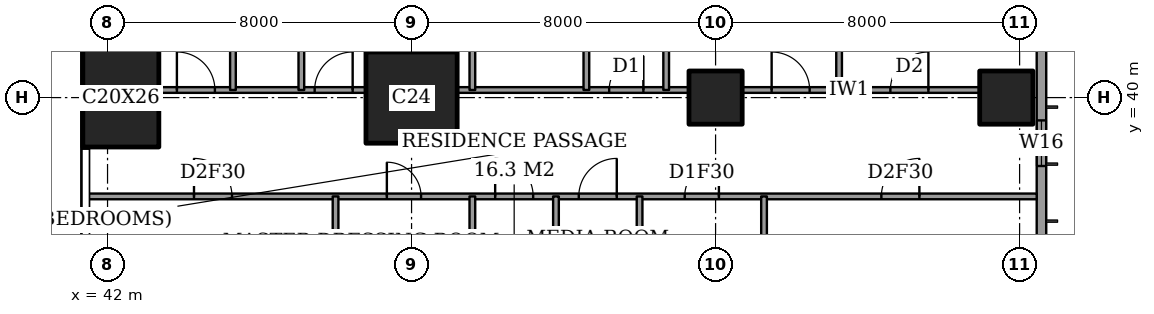
"""IFC4 building model, lengths in metres.
Left out: names, types, materials, properties, quantities, classifications, styles, units other than length and angle.
Written with IfcOpenShell. Run it as: python <this file> out.ifc"""

import sys

from ifc_helpers import new_model, si_unit, direction, frame, frame_2d, origin, origin_2d, place, context, subcontext, project, spatial, rectangle, extrude, element, fill, save


model = new_model("IFC4")
c1 = context("Model", 3, precision=1e-05, world=origin(), true_north=direction((0.0, 1.0)))
c2 = subcontext(c1, "Body", "Model", "MODEL_VIEW")
j1 = project(units=[si_unit("LENGTHUNIT", "METRE"), si_unit("PLANEANGLEUNIT", "RADIAN")], contexts=[c1])
p1 = place(None, origin())
s1 = spatial("IfcSite", under=j1, at=p1, CompositionType="ELEMENT")
p2 = place(p1, origin())
s2 = spatial("IfcBuilding", under=s1, at=p2, CompositionType="ELEMENT")
p3 = place(p2, frame((0.0, 0.0, 287.1)))
s3 = spatial("IfcBuildingStorey", under=s2, at=p3, CompositionType="ELEMENT", Elevation=287.1)
p4 = place(p3, frame((42.35, 40.0, 0.0), z_axis=(0.0, 0.0, 1.0), x_axis=(1.0, 0.0, 0.0)))
e1 = element("IfcColumn", 1, at=p4, inside=s3, PredefinedType="COLUMN", context=c2, shape_type="SweptSolid", body=[
    extrude(rectangle(XDim=2.0, YDim=2.6, at=origin_2d()), origin(), (0.0, 0.0, 1.0), 4.5),
])
p5 = place(p3, frame((50.0, 40.0, 0.0), z_axis=(0.0, 0.0, 1.0), x_axis=(1.0, 0.0, 0.0)))
e2 = element("IfcColumn", 2, at=p5, inside=s3, PredefinedType="COLUMN", context=c2, shape_type="SweptSolid", body=[
    extrude(rectangle(XDim=2.4, YDim=2.4, at=origin_2d()), origin(), (0.0, 0.0, 1.0), 4.5),
])
for number, where, z_axis, x_axis in (
    (3, (58.0, 40.0, 0.0), (0.0, 0.0, 1.0), (1.0, 0.0, 0.0)),
    (4, (65.65, 40.0, 0.0), (0.0, 0.0, 1.0), (1.0, 0.0, 0.0)),
):
    element("IfcColumn", number, at=place(p3, frame(where, z_axis=z_axis, x_axis=x_axis)), inside=s3, PredefinedType="COLUMN", context=c2, shape_type="SweptSolid", body=[
        extrude(rectangle(XDim=1.4, YDim=1.4, at=origin_2d()), origin(), (0.0, 0.0, 1.0), 4.5),
    ])
p6 = place(p3, frame((66.575, 3.175, 0.0), z_axis=(0.0, 0.0, 1.0), x_axis=(0.0, 1.0, 0.0)))
e5 = element("IfcWall", 5, at=p6, inside=s3, PredefinedType="SOLIDWALL", context=c2, shape_type="SweptSolid", body=[
    extrude(rectangle(XDim=41.65, YDim=0.25, at=frame_2d((20.825, 0.0))), origin(), (0.0, 0.0, 1.0), 4.5),
])
p7 = place(p6, frame((1.275, 0.0, 0.6)))
e6 = element("IfcOpeningElement", 6, at=p7, cuts=e5, PredefinedType="OPENING", context=c2, shape_type="SweptSolid", body=[
    extrude(rectangle(XDim=2.4, YDim=2.8, at=frame_2d((1.2, 1.4))), frame((0.0, 0.135, 0.0), z_axis=(0.0, -1.0, 0.0), x_axis=(1.0, 0.0, 0.0)), (0.0, 0.0, 1.0), 0.27),
])
p8 = place(p6, frame((5.525, 0.0, 0.6)))
e7 = element("IfcOpeningElement", 7, at=p8, cuts=e5, PredefinedType="OPENING", context=c2, shape_type="SweptSolid", body=[
    extrude(rectangle(XDim=1.2, YDim=2.8, at=frame_2d((0.6, 1.4))), frame((0.0, 0.135, 0.0), z_axis=(0.0, -1.0, 0.0), x_axis=(1.0, 0.0, 0.0)), (0.0, 0.0, 1.0), 0.27),
])
p9 = place(p6, frame((9.425, 0.0, 0.6)))
e8 = element("IfcOpeningElement", 8, at=p9, cuts=e5, PredefinedType="OPENING", context=c2, shape_type="SweptSolid", body=[
    extrude(rectangle(XDim=2.4, YDim=2.8, at=frame_2d((1.2, 1.4))), frame((0.0, 0.135, 0.0), z_axis=(0.0, -1.0, 0.0), x_axis=(1.0, 0.0, 0.0)), (0.0, 0.0, 1.0), 0.27),
])
p10 = place(p6, frame((14.525, 0.0, 0.6)))
e9 = element("IfcOpeningElement", 9, at=p10, cuts=e5, PredefinedType="OPENING", context=c2, shape_type="SweptSolid", body=[
    extrude(rectangle(XDim=2.4, YDim=2.8, at=frame_2d((1.2, 1.4))), frame((0.0, 0.135, 0.0), z_axis=(0.0, -1.0, 0.0), x_axis=(1.0, 0.0, 0.0)), (0.0, 0.0, 1.0), 0.27),
])
p11 = place(p6, frame((17.725, 0.0, 0.6)))
e10 = element("IfcOpeningElement", 10, at=p11, cuts=e5, PredefinedType="OPENING", context=c2, shape_type="SweptSolid", body=[
    extrude(rectangle(XDim=2.4, YDim=2.8, at=frame_2d((1.2, 1.4))), frame((0.0, 0.135, 0.0), z_axis=(0.0, -1.0, 0.0), x_axis=(1.0, 0.0, 0.0)), (0.0, 0.0, 1.0), 0.27),
])
p12 = place(p6, frame((21.525, 0.0, 0.6)))
e11 = element("IfcOpeningElement", 11, at=p12, cuts=e5, PredefinedType="OPENING", context=c2, shape_type="SweptSolid", body=[
    extrude(rectangle(XDim=2.4, YDim=2.8, at=frame_2d((1.2, 1.4))), frame((0.0, 0.135, 0.0), z_axis=(0.0, -1.0, 0.0), x_axis=(1.0, 0.0, 0.0)), (0.0, 0.0, 1.0), 0.27),
])
p13 = place(p6, frame((24.725, 0.0, 0.6)))
e12 = element("IfcOpeningElement", 12, at=p13, cuts=e5, PredefinedType="OPENING", context=c2, shape_type="SweptSolid", body=[
    extrude(rectangle(XDim=2.4, YDim=2.8, at=frame_2d((1.2, 1.4))), frame((0.0, 0.135, 0.0), z_axis=(0.0, -1.0, 0.0), x_axis=(1.0, 0.0, 0.0)), (0.0, 0.0, 1.0), 0.27),
])
p14 = place(p6, frame((29.825, 0.0, 0.6)))
e13 = element("IfcOpeningElement", 13, at=p14, cuts=e5, PredefinedType="OPENING", context=c2, shape_type="SweptSolid", body=[
    extrude(rectangle(XDim=2.4, YDim=2.8, at=frame_2d((1.2, 1.4))), frame((0.0, 0.135, 0.0), z_axis=(0.0, -1.0, 0.0), x_axis=(1.0, 0.0, 0.0)), (0.0, 0.0, 1.0), 0.27),
])
p15 = place(p6, frame((35.025, 0.0, 0.6)))
e14 = element("IfcOpeningElement", 14, at=p15, cuts=e5, PredefinedType="OPENING", context=c2, shape_type="SweptSolid", body=[
    extrude(rectangle(XDim=1.2, YDim=2.8, at=frame_2d((0.6, 1.4))), frame((0.0, 0.135, 0.0), z_axis=(0.0, -1.0, 0.0), x_axis=(1.0, 0.0, 0.0)), (0.0, 0.0, 1.0), 0.27),
])
p16 = place(p6, frame((38.075, 0.0, 0.6)))
e15 = element("IfcOpeningElement", 15, at=p16, cuts=e5, PredefinedType="OPENING", context=c2, shape_type="SweptSolid", body=[
    extrude(rectangle(XDim=2.4, YDim=2.8, at=frame_2d((1.2, 1.4))), frame((0.0, 0.135, 0.0), z_axis=(0.0, -1.0, 0.0), x_axis=(1.0, 0.0, 0.0)), (0.0, 0.0, 1.0), 0.27),
])
p17 = place(p3, frame((41.439, 37.4, 0.0), z_axis=(0.0, 0.0, 1.0), x_axis=(1.0, 0.0, 0.0)))
e16 = element("IfcWall", 16, at=p17, inside=s3, PredefinedType="PARTITIONING", context=c2, shape_type="SweptSolid", body=[
    extrude(rectangle(XDim=25.011, YDim=0.15, at=frame_2d((12.505, 0.0))), origin(), (0.0, 0.0, 1.0), 4.2),
])
p18 = place(p17, frame((10.761, 0.0, 0.0)))
e17 = element("IfcOpeningElement", 17, at=p18, cuts=e16, PredefinedType="OPENING", context=c2, shape_type="SweptSolid", body=[
    extrude(rectangle(XDim=1.0, YDim=2.1, at=frame_2d((0.5, 1.05))), frame((0.0, 0.085, 0.0), z_axis=(0.0, -1.0, 0.0), x_axis=(1.0, 0.0, 0.0)), (0.0, 0.0, 1.0), 0.17),
])
p19 = place(p17, frame((20.924, 0.0, 0.0)))
e18 = element("IfcOpeningElement", 18, at=p19, cuts=e16, PredefinedType="OPENING", context=c2, shape_type="SweptSolid", body=[
    extrude(rectangle(XDim=1.0, YDim=2.1, at=frame_2d((0.5, 1.05))), frame((0.0, 0.085, 0.0), z_axis=(0.0, -1.0, 0.0), x_axis=(1.0, 0.0, 0.0)), (0.0, 0.0, 1.0), 0.17),
])
p20 = place(p17, frame((15.749, 0.0, 0.0)))
e19 = element("IfcOpeningElement", 19, at=p20, cuts=e16, PredefinedType="OPENING", context=c2, shape_type="SweptSolid", body=[
    extrude(rectangle(XDim=0.9, YDim=2.1, at=frame_2d((0.45, 1.05))), frame((0.0, 0.085, 0.0), z_axis=(0.0, -1.0, 0.0), x_axis=(1.0, 0.0, 0.0)), (0.0, 0.0, 1.0), 0.17),
])
p21 = place(p17, frame((12.961, 0.0, 0.0)))
e20 = element("IfcOpeningElement", 20, at=p21, cuts=e16, PredefinedType="OPENING", context=c2, shape_type="SweptSolid", body=[
    extrude(rectangle(XDim=1.0, YDim=2.1, at=frame_2d((0.5, 1.05))), frame((0.0, 0.085, 0.0), z_axis=(0.0, -1.0, 0.0), x_axis=(1.0, 0.0, 0.0)), (0.0, 0.0, 1.0), 0.17),
])
p22 = place(p17, frame((7.911, 0.0, 0.0)))
e21 = element("IfcOpeningElement", 21, at=p22, cuts=e16, PredefinedType="OPENING", context=c2, shape_type="SweptSolid", body=[
    extrude(rectangle(XDim=0.9, YDim=2.1, at=frame_2d((0.45, 1.05))), frame((0.0, 0.085, 0.0), z_axis=(0.0, -1.0, 0.0), x_axis=(1.0, 0.0, 0.0)), (0.0, 0.0, 1.0), 0.17),
])
p23 = place(p17, frame((2.836, 0.0, 0.0)))
e22 = element("IfcOpeningElement", 22, at=p23, cuts=e16, PredefinedType="OPENING", context=c2, shape_type="SweptSolid", body=[
    extrude(rectangle(XDim=1.0, YDim=2.1, at=frame_2d((0.5, 1.05))), frame((0.0, 0.085, 0.0), z_axis=(0.0, -1.0, 0.0), x_axis=(1.0, 0.0, 0.0)), (0.0, 0.0, 1.0), 0.17),
])
p24 = place(p3, frame((43.35, 40.2, 0.0), z_axis=(0.0, 0.0, 1.0), x_axis=(1.0, 0.0, 0.0)))
e23 = element("IfcWall", 23, at=p24, inside=s3, PredefinedType="PARTITIONING", context=c2, shape_type="SweptSolid", body=[
    extrude(rectangle(XDim=5.45, YDim=0.15, at=frame_2d((2.725, 0.0))), origin(), (0.0, 0.0, 1.0), 4.2),
])
p25 = place(p24, frame((4.1, 0.0, 0.0)))
e24 = element("IfcOpeningElement", 24, at=p25, cuts=e23, PredefinedType="OPENING", context=c2, shape_type="SweptSolid", body=[
    extrude(rectangle(XDim=1.0, YDim=2.1, at=frame_2d((0.5, 1.05))), frame((0.0, 0.085, 0.0), z_axis=(0.0, -1.0, 0.0), x_axis=(1.0, 0.0, 0.0)), (0.0, 0.0, 1.0), 0.17),
])
p26 = place(p24, frame((0.475, 0.0, 0.0)))
e25 = element("IfcOpeningElement", 25, at=p26, cuts=e23, PredefinedType="OPENING", context=c2, shape_type="SweptSolid", body=[
    extrude(rectangle(XDim=1.0, YDim=2.1, at=frame_2d((0.5, 1.05))), frame((0.0, 0.085, 0.0), z_axis=(0.0, -1.0, 0.0), x_axis=(1.0, 0.0, 0.0)), (0.0, 0.0, 1.0), 0.17),
])
p27 = place(p3, frame((51.2, 40.2, 0.0), z_axis=(0.0, 0.0, 1.0), x_axis=(1.0, 0.0, 0.0)))
e26 = element("IfcWall", 26, at=p27, inside=s3, PredefinedType="PARTITIONING", context=c2, shape_type="SweptSolid", body=[
    extrude(rectangle(XDim=6.1, YDim=0.15, at=frame_2d((3.05, 0.0))), origin(), (0.0, 0.0, 1.0), 4.2),
])
p28 = place(p27, frame((4.0, 0.0, 0.0)))
e27 = element("IfcOpeningElement", 27, at=p28, cuts=e26, PredefinedType="OPENING", context=c2, shape_type="SweptSolid", body=[
    extrude(rectangle(XDim=0.9, YDim=2.1, at=frame_2d((0.45, 1.05))), frame((0.0, 0.085, 0.0), z_axis=(0.0, -1.0, 0.0), x_axis=(1.0, 0.0, 0.0)), (0.0, 0.0, 1.0), 0.17),
])
p29 = place(p3, frame((58.7, 40.2, 0.0), z_axis=(0.0, 0.0, 1.0), x_axis=(1.0, 0.0, 0.0)))
e28 = element("IfcWall", 28, at=p29, inside=s3, PredefinedType="PARTITIONING", context=c2, shape_type="SweptSolid", body=[
    extrude(rectangle(XDim=6.25, YDim=0.15, at=frame_2d((3.125, 0.0))), origin(), (0.0, 0.0, 1.0), 4.2),
])
p30 = place(p29, frame((3.9, 0.0, 0.0)))
e29 = element("IfcOpeningElement", 29, at=p30, cuts=e28, PredefinedType="OPENING", context=c2, shape_type="SweptSolid", body=[
    extrude(rectangle(XDim=1.0, YDim=2.1, at=frame_2d((0.5, 1.05))), frame((0.0, 0.085, 0.0), z_axis=(0.0, -1.0, 0.0), x_axis=(1.0, 0.0, 0.0)), (0.0, 0.0, 1.0), 0.17),
])
p31 = place(p29, frame((0.775, 0.0, 0.0)))
e30 = element("IfcOpeningElement", 30, at=p31, cuts=e28, PredefinedType="OPENING", context=c2, shape_type="SweptSolid", body=[
    extrude(rectangle(XDim=1.0, YDim=2.1, at=frame_2d((0.5, 1.05))), frame((0.0, 0.085, 0.0), z_axis=(0.0, -1.0, 0.0), x_axis=(1.0, 0.0, 0.0)), (0.0, 0.0, 1.0), 0.17),
])
p32 = place(p3, frame((45.3, 40.2, 0.0), z_axis=(0.0, 0.0, 1.0), x_axis=(0.0, 1.0, 0.0)))
e31 = element("IfcWall", 31, at=p32, inside=s3, PredefinedType="PARTITIONING", context=c2, shape_type="SweptSolid", body=[
    extrude(rectangle(XDim=8.361, YDim=0.15, at=frame_2d((4.181, 0.0))), origin(), (0.0, 0.0, 1.0), 4.2),
])
p33 = place(p32, frame((3.675, 0.0, 0.0)))
e32 = element("IfcOpeningElement", 32, at=p33, cuts=e31, PredefinedType="OPENING", context=c2, shape_type="SweptSolid", body=[
    extrude(rectangle(XDim=0.9, YDim=2.1, at=frame_2d((0.45, 1.05))), frame((0.0, 0.085, 0.0), z_axis=(0.0, -1.0, 0.0), x_axis=(1.0, 0.0, 0.0)), (0.0, 0.0, 1.0), 0.17),
])
p34 = place(p3, frame((47.1, 40.2, 0.0), z_axis=(0.0, 0.0, 1.0), x_axis=(0.0, 1.0, 0.0)))
e33 = element("IfcWall", 33, at=p34, inside=s3, PredefinedType="PARTITIONING", context=c2, shape_type="SweptSolid", body=[
    extrude(rectangle(XDim=8.361, YDim=0.15, at=frame_2d((4.181, 0.0))), origin(), (0.0, 0.0, 1.0), 4.2),
])
p35 = place(p3, frame((48.0, 28.0, 0.0), z_axis=(0.0, 0.0, 1.0), x_axis=(0.0, 1.0, 0.0)))
e34 = element("IfcWall", 34, at=p35, inside=s3, PredefinedType="PARTITIONING", context=c2, shape_type="SweptSolid", body=[
    extrude(rectangle(XDim=9.4, YDim=0.15, at=frame_2d((4.7, 0.0))), origin(), (0.0, 0.0, 1.0), 4.2),
])
p36 = place(p35, frame((0.5, 0.0, 0.0)))
e35 = element("IfcOpeningElement", 35, at=p36, cuts=e34, PredefinedType="OPENING", context=c2, shape_type="SweptSolid", body=[
    extrude(rectangle(XDim=1.0, YDim=2.1, at=frame_2d((0.5, 1.05))), frame((0.0, 0.085, 0.0), z_axis=(0.0, -1.0, 0.0), x_axis=(1.0, 0.0, 0.0)), (0.0, 0.0, 1.0), 0.17),
])
p37 = place(p3, frame((51.6, 30.0, 0.0), z_axis=(0.0, 0.0, 1.0), x_axis=(0.0, 1.0, 0.0)))
e36 = element("IfcWall", 36, at=p37, inside=s3, PredefinedType="PARTITIONING", context=c2, shape_type="SweptSolid", body=[
    extrude(rectangle(XDim=7.4, YDim=0.15, at=frame_2d((3.7, 0.0))), origin(), (0.0, 0.0, 1.0), 4.2),
])
p38 = place(p3, frame((51.6, 40.2, 0.0), z_axis=(0.0, 0.0, 1.0), x_axis=(0.0, 1.0, 0.0)))
e37 = element("IfcWall", 37, at=p38, inside=s3, PredefinedType="PARTITIONING", context=c2, shape_type="SweptSolid", body=[
    extrude(rectangle(XDim=8.361, YDim=0.15, at=frame_2d((4.181, 0.0))), origin(), (0.0, 0.0, 1.0), 4.2),
])
p39 = place(p38, frame((3.675, 0.0, 0.0)))
e38 = element("IfcOpeningElement", 38, at=p39, cuts=e37, PredefinedType="OPENING", context=c2, shape_type="SweptSolid", body=[
    extrude(rectangle(XDim=0.9, YDim=2.1, at=frame_2d((0.45, 1.05))), frame((0.0, 0.085, 0.0), z_axis=(0.0, -1.0, 0.0), x_axis=(1.0, 0.0, 0.0)), (0.0, 0.0, 1.0), 0.17),
])
p40 = place(p3, frame((53.8, 30.0, 0.0), z_axis=(0.0, 0.0, 1.0), x_axis=(0.0, 1.0, 0.0)))
e39 = element("IfcWall", 39, at=p40, inside=s3, PredefinedType="PARTITIONING", context=c2, shape_type="SweptSolid", body=[
    extrude(rectangle(XDim=7.4, YDim=0.15, at=frame_2d((3.7, 0.0))), origin(), (0.0, 0.0, 1.0), 4.2),
])
p41 = place(p3, frame((54.6, 40.2, 0.0), z_axis=(0.0, 0.0, 1.0), x_axis=(0.0, 1.0, 0.0)))
e40 = element("IfcWall", 40, at=p41, inside=s3, PredefinedType="PARTITIONING", context=c2, shape_type="SweptSolid", body=[
    extrude(rectangle(XDim=8.361, YDim=0.15, at=frame_2d((4.181, 0.0))), origin(), (0.0, 0.0, 1.0), 4.2),
])
p42 = place(p3, frame((56.0, 28.0, 0.0), z_axis=(0.0, 0.0, 1.0), x_axis=(0.0, 1.0, 0.0)))
e41 = element("IfcWall", 41, at=p42, inside=s3, PredefinedType="PARTITIONING", context=c2, shape_type="SweptSolid", body=[
    extrude(rectangle(XDim=9.4, YDim=0.15, at=frame_2d((4.7, 0.0))), origin(), (0.0, 0.0, 1.0), 4.2),
])
p43 = place(p42, frame((0.5, 0.0, 0.0)))
e42 = element("IfcOpeningElement", 42, at=p43, cuts=e41, PredefinedType="OPENING", context=c2, shape_type="SweptSolid", body=[
    extrude(rectangle(XDim=1.0, YDim=2.1, at=frame_2d((0.5, 1.05))), frame((0.0, 0.085, 0.0), z_axis=(0.0, -1.0, 0.0), x_axis=(1.0, 0.0, 0.0)), (0.0, 0.0, 1.0), 0.17),
])
p44 = place(p3, frame((56.7, 40.2, 0.0), z_axis=(0.0, 0.0, 1.0), x_axis=(0.0, 1.0, 0.0)))
e43 = element("IfcWall", 43, at=p44, inside=s3, PredefinedType="PARTITIONING", context=c2, shape_type="SweptSolid", body=[
    extrude(rectangle(XDim=8.361, YDim=0.15, at=frame_2d((4.181, 0.0))), origin(), (0.0, 0.0, 1.0), 4.2),
])
p45 = place(p3, frame((59.275, 33.2, 0.0), z_axis=(0.0, 0.0, 1.0), x_axis=(0.0, 1.0, 0.0)))
e44 = element("IfcWall", 44, at=p45, inside=s3, PredefinedType="PARTITIONING", context=c2, shape_type="SweptSolid", body=[
    extrude(rectangle(XDim=4.2, YDim=0.15, at=frame_2d((2.1, 0.0))), origin(), (0.0, 0.0, 1.0), 4.2),
])
p46 = place(p3, frame((61.25, 40.2, 0.0), z_axis=(0.0, 0.0, 1.0), x_axis=(0.0, 1.0, 0.0)))
e45 = element("IfcWall", 45, at=p46, inside=s3, PredefinedType="PARTITIONING", context=c2, shape_type="SweptSolid", body=[
    extrude(rectangle(XDim=8.361, YDim=0.15, at=frame_2d((4.181, 0.0))), origin(), (0.0, 0.0, 1.0), 4.2),
])
p47 = place(p15, origin())
e46 = element("IfcWindow", 46, at=p47, inside=s3, PartitioningType="SINGLE_PANEL", PredefinedType="WINDOW", context=c2, shape_type="SweptSolid", body=[
    extrude(rectangle(XDim=1.2, YDim=2.8, at=frame_2d((0.6, 1.4))), frame((0.0, 0.03, 0.0), z_axis=(0.0, -1.0, 0.0), x_axis=(1.0, 0.0, 0.0)), (0.0, 0.0, 1.0), 0.06),
])
fill(e14, e46)
p48 = place(p30, origin())
e47 = element("IfcDoor", 47, at=p48, inside=s3, OperationType="SINGLE_SWING_LEFT", PredefinedType="DOOR", context=c2, shape_type="SweptSolid", body=[
    extrude(rectangle(XDim=1.0, YDim=2.1, at=frame_2d((0.5, 1.05))), frame((0.0, 0.025, 0.0), z_axis=(0.0, -1.0, 0.0), x_axis=(1.0, 0.0, 0.0)), (0.0, 0.0, 1.0), 0.05),
])
fill(e29, e47)
p49 = place(p31, origin())
e48 = element("IfcDoor", 48, at=p49, inside=s3, OperationType="SINGLE_SWING_RIGHT", PredefinedType="DOOR", context=c2, shape_type="SweptSolid", body=[
    extrude(rectangle(XDim=1.0, YDim=2.1, at=frame_2d((0.5, 1.05))), frame((0.0, 0.025, 0.0), z_axis=(0.0, -1.0, 0.0), x_axis=(1.0, 0.0, 0.0)), (0.0, 0.0, 1.0), 0.05),
])
fill(e30, e48)
p50 = place(p28, origin())
e49 = element("IfcDoor", 49, at=p50, inside=s3, OperationType="SINGLE_SWING_LEFT", PredefinedType="DOOR", context=c2, shape_type="SweptSolid", body=[
    extrude(rectangle(XDim=0.9, YDim=2.1, at=frame_2d((0.45, 1.05))), frame((0.0, 0.025, 0.0), z_axis=(0.0, -1.0, 0.0), x_axis=(1.0, 0.0, 0.0)), (0.0, 0.0, 1.0), 0.05),
])
fill(e27, e49)
p51 = place(p25, origin())
e50 = element("IfcDoor", 50, at=p51, inside=s3, OperationType="SINGLE_SWING_LEFT", PredefinedType="DOOR", context=c2, shape_type="SweptSolid", body=[
    extrude(rectangle(XDim=1.0, YDim=2.1, at=frame_2d((0.5, 1.05))), frame((0.0, 0.025, 0.0), z_axis=(0.0, -1.0, 0.0), x_axis=(1.0, 0.0, 0.0)), (0.0, 0.0, 1.0), 0.05),
])
fill(e24, e50)
p52 = place(p26, origin())
e51 = element("IfcDoor", 51, at=p52, inside=s3, OperationType="SINGLE_SWING_RIGHT", PredefinedType="DOOR", context=c2, shape_type="SweptSolid", body=[
    extrude(rectangle(XDim=1.0, YDim=2.1, at=frame_2d((0.5, 1.05))), frame((0.0, 0.025, 0.0), z_axis=(0.0, -1.0, 0.0), x_axis=(1.0, 0.0, 0.0)), (0.0, 0.0, 1.0), 0.05),
])
fill(e25, e51)
p53 = place(p18, origin())
e52 = element("IfcDoor", 52, at=p53, inside=s3, OperationType="SINGLE_SWING_RIGHT", PredefinedType="DOOR", context=c2, shape_type="SweptSolid", body=[
    extrude(rectangle(XDim=1.0, YDim=2.1, at=frame_2d((0.5, 1.05))), frame((0.0, 0.025, 0.0), z_axis=(0.0, -1.0, 0.0), x_axis=(1.0, 0.0, 0.0)), (0.0, 0.0, 1.0), 0.05),
])
fill(e17, e52)
p54 = place(p19, origin())
e53 = element("IfcDoor", 53, at=p54, inside=s3, OperationType="SINGLE_SWING_LEFT", PredefinedType="DOOR", context=c2, shape_type="SweptSolid", body=[
    extrude(rectangle(XDim=1.0, YDim=2.1, at=frame_2d((0.5, 1.05))), frame((0.0, 0.025, 0.0), z_axis=(0.0, -1.0, 0.0), x_axis=(1.0, 0.0, 0.0)), (0.0, 0.0, 1.0), 0.05),
])
fill(e18, e53)
p55 = place(p20, origin())
e54 = element("IfcDoor", 54, at=p55, inside=s3, OperationType="SINGLE_SWING_LEFT", PredefinedType="DOOR", context=c2, shape_type="SweptSolid", body=[
    extrude(rectangle(XDim=0.9, YDim=2.1, at=frame_2d((0.45, 1.05))), frame((0.0, 0.025, 0.0), z_axis=(0.0, -1.0, 0.0), x_axis=(1.0, 0.0, 0.0)), (0.0, 0.0, 1.0), 0.05),
])
fill(e19, e54)
p56 = place(p21, origin())
e55 = element("IfcDoor", 55, at=p56, inside=s3, OperationType="SINGLE_SWING_LEFT", PredefinedType="DOOR", context=c2, shape_type="SweptSolid", body=[
    extrude(rectangle(XDim=1.0, YDim=2.1, at=frame_2d((0.5, 1.05))), frame((0.0, 0.025, 0.0), z_axis=(0.0, -1.0, 0.0), x_axis=(1.0, 0.0, 0.0)), (0.0, 0.0, 1.0), 0.05),
])
fill(e20, e55)
p57 = place(p22, origin())
e56 = element("IfcDoor", 56, at=p57, inside=s3, OperationType="SINGLE_SWING_RIGHT", PredefinedType="DOOR", context=c2, shape_type="SweptSolid", body=[
    extrude(rectangle(XDim=0.9, YDim=2.1, at=frame_2d((0.45, 1.05))), frame((0.0, 0.025, 0.0), z_axis=(0.0, -1.0, 0.0), x_axis=(1.0, 0.0, 0.0)), (0.0, 0.0, 1.0), 0.05),
])
fill(e21, e56)
p58 = place(p23, origin())
e57 = element("IfcDoor", 57, at=p58, inside=s3, OperationType="SINGLE_SWING_RIGHT", PredefinedType="DOOR", context=c2, shape_type="SweptSolid", body=[
    extrude(rectangle(XDim=1.0, YDim=2.1, at=frame_2d((0.5, 1.05))), frame((0.0, 0.025, 0.0), z_axis=(0.0, -1.0, 0.0), x_axis=(1.0, 0.0, 0.0)), (0.0, 0.0, 1.0), 0.05),
])
fill(e22, e57)
save(model, sys.argv[1])
